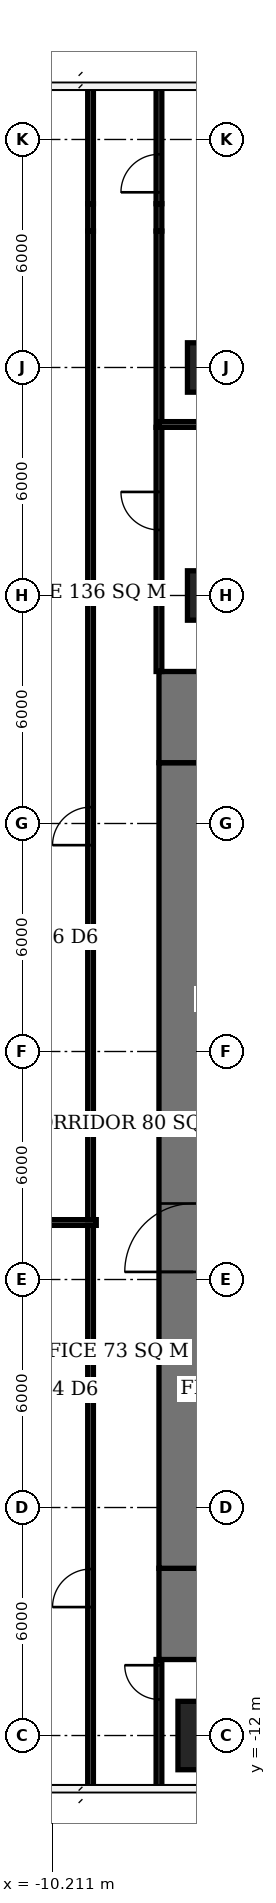
"""IFC4 building model, lengths in metres.
Left out: names, types, materials, properties, quantities, classifications, styles, units other than length and angle.
Written with IfcOpenShell. Run it as: python <this file> out.ifc"""

import sys

from ifc_helpers import new_model, si_unit, direction, frame, frame_2d, origin, origin_2d, place, context, subcontext, project, spatial, rectangle, extrude, element, fill, save


model = new_model("IFC4")
c1 = context("Model", 3, precision=1e-05, world=origin(), true_north=direction((0.0, 1.0)))
c2 = subcontext(c1, "Body", "Model", "MODEL_VIEW")
j1 = project(units=[si_unit("LENGTHUNIT", "METRE"), si_unit("PLANEANGLEUNIT", "RADIAN")], contexts=[c1])
p1 = place(None, origin())
s1 = spatial("IfcSite", under=j1, at=p1, CompositionType="ELEMENT")
p2 = place(p1, origin())
s2 = spatial("IfcBuilding", under=s1, at=p2, CompositionType="ELEMENT")
p3 = place(p2, frame((0.0, 0.0, 196.7)))
s3 = spatial("IfcBuildingStorey", under=s2, at=p3, CompositionType="ELEMENT", Elevation=196.7)
p4 = place(p3, frame((-6.0, -12.0, 0.0), z_axis=(0.0, 0.0, 1.0), x_axis=(1.0, 0.0, 0.0)))
e1 = element("IfcColumn", 1, at=p4, inside=s3, PredefinedType="COLUMN", context=c2, shape_type="SweptSolid", body=[
    extrude(rectangle(XDim=1.8, YDim=1.8, at=origin_2d()), origin(), (0.0, 0.0, 1.0), 3.9),
])
for number, where, z_axis, x_axis in (
    (2, (-6.0, 18.0, 0.0), (0.0, 0.0, 1.0), (1.0, 0.0, 0.0)),
    (3, (-6.0, 24.0, 0.0), (0.0, 0.0, 1.0), (1.0, 0.0, 0.0)),
):
    element("IfcColumn", number, at=place(p3, frame(where, z_axis=z_axis, x_axis=x_axis)), inside=s3, PredefinedType="COLUMN", context=c2, shape_type="SweptSolid", body=[
        extrude(rectangle(XDim=1.3, YDim=1.3, at=origin_2d()), origin(), (0.0, 0.0, 1.0), 3.9),
    ])
p5 = place(p3, frame((-6.5, -7.6, 0.0), z_axis=(0.0, 0.0, 1.0), x_axis=(0.0, 1.0, 0.0)))
e4 = element("IfcWall", 4, at=p5, inside=s3, PredefinedType="SHEAR", context=c2, shape_type="SweptSolid", body=[
    extrude(rectangle(XDim=21.2, YDim=1.8, at=frame_2d((10.6, 0.0))), origin(), (0.0, 0.0, 1.0), 3.9),
])
p6 = place(p5, frame((7.8, 0.0, 0.0)))
e5 = element("IfcOpeningElement", 5, at=p6, cuts=e4, PredefinedType="OPENING", context=c2, shape_type="SweptSolid", body=[
    extrude(rectangle(XDim=1.8, YDim=2.4, at=frame_2d((0.9, 1.2))), frame((0.0, 0.91, 0.0), z_axis=(0.0, -1.0, 0.0), x_axis=(1.0, 0.0, 0.0)), (0.0, 0.0, 1.0), 1.82),
])
for number, where, z_axis, x_axis in (
    (6, (-6.5, -10.0, 0.0), (0.0, 0.0, 1.0), (0.0, 1.0, 0.0)),
    (7, (-6.5, 13.6, 0.0), (0.0, 0.0, 1.0), (0.0, 1.0, 0.0)),
):
    element("IfcWall", number, at=place(p3, frame(where, z_axis=z_axis, x_axis=x_axis)), inside=s3, PredefinedType="SHEAR", context=c2, shape_type="SweptSolid", body=[
        extrude(rectangle(XDim=2.4, YDim=1.8, at=frame_2d((1.2, 0.0))), origin(), (0.0, 0.0, 1.0), 3.9),
    ])
p7 = place(p3, frame((-13.425, 1.5, 0.0), z_axis=(0.0, 0.0, 1.0), x_axis=(1.0, 0.0, 0.0)))
e8 = element("IfcWall", 8, at=p7, inside=s3, PredefinedType="PARTITIONING", context=c2, shape_type="SweptSolid", body=[
    extrude(rectangle(XDim=4.375, YDim=0.15, at=frame_2d((2.188, 0.0))), origin(), (0.0, 0.0, 1.0), 3.65),
])
p8 = place(p3, frame((-9.2, -13.4, 0.0), z_axis=(0.0, 0.0, 1.0), x_axis=(0.0, 1.0, 0.0)))
e9 = element("IfcWall", 9, at=p8, inside=s3, PredefinedType="PARTITIONING", context=c2, shape_type="SweptSolid", body=[
    extrude(rectangle(XDim=14.825, YDim=0.15, at=frame_2d((7.413, 0.0))), origin(), (0.0, 0.0, 1.0), 3.65),
])
p9 = place(p8, frame((4.78, 0.0, 0.0)))
e10 = element("IfcOpeningElement", 10, at=p9, cuts=e9, PredefinedType="OPENING", context=c2, shape_type="SweptSolid", body=[
    extrude(rectangle(XDim=1.0, YDim=2.1, at=frame_2d((0.5, 1.05))), frame((0.0, 0.085, 0.0), z_axis=(0.0, -1.0, 0.0), x_axis=(1.0, 0.0, 0.0)), (0.0, 0.0, 1.0), 0.17),
])
p10 = place(p3, frame((-9.2, 1.575, 0.0), z_axis=(0.0, 0.0, 1.0), x_axis=(0.0, 1.0, 0.0)))
e11 = element("IfcWall", 11, at=p10, inside=s3, PredefinedType="PARTITIONING", context=c2, shape_type="SweptSolid", body=[
    extrude(rectangle(XDim=26.015, YDim=0.15, at=frame_2d((13.008, 0.0))), origin(), (0.0, 0.0, 1.0), 3.65),
])
p11 = place(p10, frame((9.855, 0.0, 0.0)))
e12 = element("IfcOpeningElement", 12, at=p11, cuts=e11, PredefinedType="OPENING", context=c2, shape_type="SweptSolid", body=[
    extrude(rectangle(XDim=1.0, YDim=2.1, at=frame_2d((0.5, 1.05))), frame((0.0, 0.085, 0.0), z_axis=(0.0, -1.0, 0.0), x_axis=(1.0, 0.0, 0.0)), (0.0, 0.0, 1.0), 0.17),
])
p12 = place(p3, frame((-9.2, 27.59, 0.0), z_axis=(0.0, 0.0, 1.0), x_axis=(0.0, 1.0, 0.0)))
e13 = element("IfcWall", 13, at=p12, inside=s3, PredefinedType="PARTITIONING", context=c2, shape_type="SweptSolid", body=[
    extrude(rectangle(XDim=0.72, YDim=0.15, at=frame_2d((0.36, 0.0))), origin(), (0.0, 0.0, 1.0), 2.65),
])
p13 = place(p3, frame((-9.2, 28.31, 0.0), z_axis=(0.0, 0.0, 1.0), x_axis=(0.0, 1.0, 0.0)))
e14 = element("IfcWall", 14, at=p13, inside=s3, PredefinedType="PARTITIONING", context=c2, shape_type="SweptSolid", body=[
    extrude(rectangle(XDim=3.09, YDim=0.15, at=frame_2d((1.545, 0.0))), origin(), (0.0, 0.0, 1.0), 3.65),
])
p14 = place(p3, frame((-7.4, -13.4, 0.0), z_axis=(0.0, 0.0, 1.0), x_axis=(0.0, 1.0, 0.0)))
e15 = element("IfcWall", 15, at=p14, inside=s3, PredefinedType="PARTITIONING", context=c2, shape_type="SweptSolid", body=[
    extrude(rectangle(XDim=3.4, YDim=0.15, at=frame_2d((1.7, 0.0))), origin(), (0.0, 0.0, 1.0), 3.65),
])
p15 = place(p14, frame((2.35, 0.0, 0.0)))
e16 = element("IfcOpeningElement", 16, at=p15, cuts=e15, PredefinedType="OPENING", context=c2, shape_type="SweptSolid", body=[
    extrude(rectangle(XDim=0.9, YDim=2.1, at=frame_2d((0.45, 1.05))), frame((0.0, 0.085, 0.0), z_axis=(0.0, -1.0, 0.0), x_axis=(1.0, 0.0, 0.0)), (0.0, 0.0, 1.0), 0.17),
])
p16 = place(p3, frame((-7.4, 16.0, 0.0), z_axis=(0.0, 0.0, 1.0), x_axis=(0.0, 1.0, 0.0)))
e17 = element("IfcWall", 17, at=p16, inside=s3, PredefinedType="PARTITIONING", context=c2, shape_type="SweptSolid", body=[
    extrude(rectangle(XDim=6.425, YDim=0.15, at=frame_2d((3.212, 0.0))), origin(), (0.0, 0.0, 1.0), 3.65),
])
p17 = place(p16, frame((3.725, 0.0, 0.0)))
e18 = element("IfcOpeningElement", 18, at=p17, cuts=e17, PredefinedType="OPENING", context=c2, shape_type="SweptSolid", body=[
    extrude(rectangle(XDim=1.0, YDim=2.1, at=frame_2d((0.5, 1.05))), frame((0.0, 0.085, 0.0), z_axis=(0.0, -1.0, 0.0), x_axis=(1.0, 0.0, 0.0)), (0.0, 0.0, 1.0), 0.17),
])
p18 = place(p3, frame((-7.4, 22.425, 0.0), z_axis=(0.0, 0.0, 1.0), x_axis=(0.0, 1.0, 0.0)))
e19 = element("IfcWall", 19, at=p18, inside=s3, PredefinedType="PARTITIONING", context=c2, shape_type="SweptSolid", body=[
    extrude(rectangle(XDim=5.165, YDim=0.15, at=frame_2d((2.583, 0.0))), origin(), (0.0, 0.0, 1.0), 3.65),
])
p19 = place(p3, frame((-7.4, 27.59, 0.0), z_axis=(0.0, 0.0, 1.0), x_axis=(0.0, 1.0, 0.0)))
e20 = element("IfcWall", 20, at=p19, inside=s3, PredefinedType="PARTITIONING", context=c2, shape_type="SweptSolid", body=[
    extrude(rectangle(XDim=0.72, YDim=0.15, at=frame_2d((0.36, 0.0))), origin(), (0.0, 0.0, 1.0), 2.65),
])
p20 = place(p3, frame((-7.4, 28.31, 0.0), z_axis=(0.0, 0.0, 1.0), x_axis=(0.0, 1.0, 0.0)))
e21 = element("IfcWall", 21, at=p20, inside=s3, PredefinedType="PARTITIONING", context=c2, shape_type="SweptSolid", body=[
    extrude(rectangle(XDim=3.09, YDim=0.15, at=frame_2d((1.545, 0.0))), origin(), (0.0, 0.0, 1.0), 3.65),
])
p21 = place(p20, frame((0.3, 0.0, 0.0)))
e22 = element("IfcOpeningElement", 22, at=p21, cuts=e21, PredefinedType="OPENING", context=c2, shape_type="SweptSolid", body=[
    extrude(rectangle(XDim=1.0, YDim=2.1, at=frame_2d((0.5, 1.05))), frame((0.0, 0.085, 0.0), z_axis=(0.0, -1.0, 0.0), x_axis=(1.0, 0.0, 0.0)), (0.0, 0.0, 1.0), 0.17),
])
p22 = place(p3, frame((-7.4, 22.5, 0.0), z_axis=(0.0, 0.0, 1.0), x_axis=(1.0, 0.0, 0.0)))
e23 = element("IfcWall", 23, at=p22, inside=s3, PredefinedType="PARTITIONING", context=c2, shape_type="SweptSolid", body=[
    extrude(rectangle(XDim=15.05, YDim=0.15, at=frame_2d((7.525, 0.0))), origin(), (0.0, 0.0, 1.0), 3.65),
])
p23 = place(p6, origin())
e24 = element("IfcDoor", 24, at=p23, inside=s3, OperationType="DOUBLE_DOOR_SINGLE_SWING", PredefinedType="DOOR", context=c2, shape_type="SweptSolid", body=[
    extrude(rectangle(XDim=1.8, YDim=2.4, at=frame_2d((0.9, 1.2))), frame((0.0, 0.025, 0.0), z_axis=(0.0, -1.0, 0.0), x_axis=(1.0, 0.0, 0.0)), (0.0, 0.0, 1.0), 0.05),
])
fill(e5, e24)
p24 = place(p9, origin())
e25 = element("IfcDoor", 25, at=p24, inside=s3, OperationType="SINGLE_SWING_LEFT", PredefinedType="DOOR", context=c2, shape_type="SweptSolid", body=[
    extrude(rectangle(XDim=1.0, YDim=2.1, at=frame_2d((0.5, 1.05))), frame((0.0, 0.025, 0.0), z_axis=(0.0, -1.0, 0.0), x_axis=(1.0, 0.0, 0.0)), (0.0, 0.0, 1.0), 0.05),
])
fill(e10, e25)
p25 = place(p17, origin())
e26 = element("IfcDoor", 26, at=p25, inside=s3, OperationType="SINGLE_SWING_RIGHT", PredefinedType="DOOR", context=c2, shape_type="SweptSolid", body=[
    extrude(rectangle(XDim=1.0, YDim=2.1, at=frame_2d((0.5, 1.05))), frame((0.0, 0.025, 0.0), z_axis=(0.0, -1.0, 0.0), x_axis=(1.0, 0.0, 0.0)), (0.0, 0.0, 1.0), 0.05),
])
fill(e18, e26)
p26 = place(p11, origin())
e27 = element("IfcDoor", 27, at=p26, inside=s3, OperationType="SINGLE_SWING_LEFT", PredefinedType="DOOR", context=c2, shape_type="SweptSolid", body=[
    extrude(rectangle(XDim=1.0, YDim=2.1, at=frame_2d((0.5, 1.05))), frame((0.0, 0.025, 0.0), z_axis=(0.0, -1.0, 0.0), x_axis=(1.0, 0.0, 0.0)), (0.0, 0.0, 1.0), 0.05),
])
fill(e12, e27)
p27 = place(p21, origin())
e28 = element("IfcDoor", 28, at=p27, inside=s3, OperationType="SINGLE_SWING_LEFT", PredefinedType="DOOR", context=c2, shape_type="SweptSolid", body=[
    extrude(rectangle(XDim=1.0, YDim=2.1, at=frame_2d((0.5, 1.05))), frame((0.0, 0.025, 0.0), z_axis=(0.0, -1.0, 0.0), x_axis=(1.0, 0.0, 0.0)), (0.0, 0.0, 1.0), 0.05),
])
fill(e22, e28)
p28 = place(p15, origin())
e29 = element("IfcDoor", 29, at=p28, inside=s3, OperationType="SINGLE_SWING_RIGHT", PredefinedType="DOOR", context=c2, shape_type="SweptSolid", body=[
    extrude(rectangle(XDim=0.9, YDim=2.1, at=frame_2d((0.45, 1.05))), frame((0.0, 0.025, 0.0), z_axis=(0.0, -1.0, 0.0), x_axis=(1.0, 0.0, 0.0)), (0.0, 0.0, 1.0), 0.05),
])
fill(e16, e29)
save(model, sys.argv[1])
